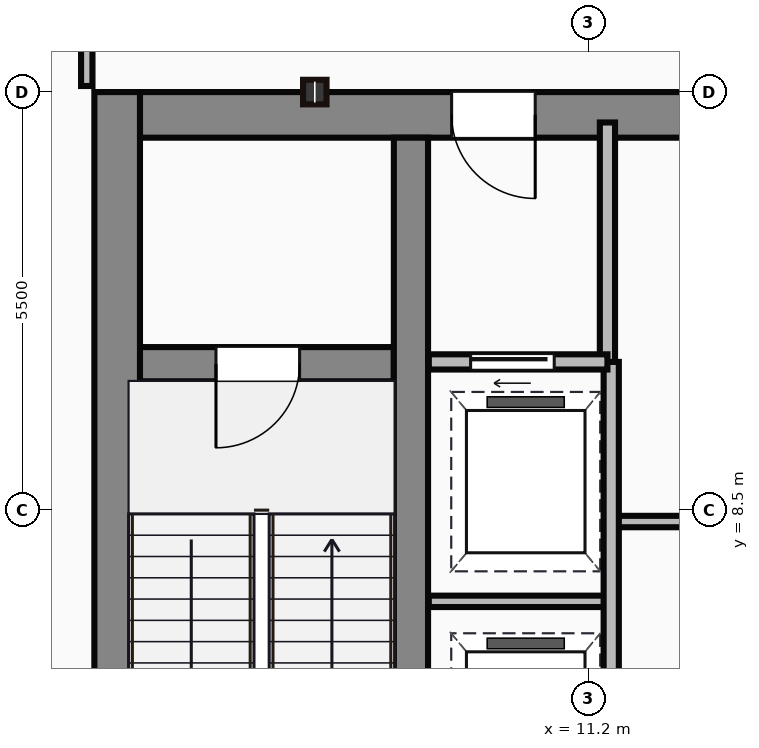
"""IFC4 building model, lengths in metres.
Left out: names, types, materials, properties, quantities, classifications, styles, units other than length and angle.
Written with IfcOpenShell. Run it as: python <this file> out.ifc"""

import sys

from ifc_helpers import new_model, si_unit, direction, frame, frame_2d, origin, origin_2d, place, context, subcontext, project, spatial, rectangle, i_section, extrude, source, transform, mapped, element, fill, save


model = new_model("IFC4")
c1 = context("Model", 3, precision=1e-05, world=origin(), true_north=direction((0.0, 1.0)))
c2 = subcontext(c1, "Body", "Model", "MODEL_VIEW")
j1 = project(units=[si_unit("LENGTHUNIT", "METRE"), si_unit("PLANEANGLEUNIT", "RADIAN")], contexts=[c1])
p1 = place(None, origin())
s1 = spatial("IfcSite", under=j1, at=p1, CompositionType="ELEMENT")
p2 = place(p1, origin())
s2 = spatial("IfcBuilding", under=s1, at=p2, CompositionType="ELEMENT")
p3 = place(p2, frame((0.0, 0.0, 210.5)))
s3 = spatial("IfcBuildingStorey", under=s2, at=p3, CompositionType="ELEMENT", Elevation=210.5)
m1 = source(origin(), c2, "Body", "SweptSolid", [
    extrude(rectangle(XDim=13.1, YDim=0.6, at=frame_2d((6.55, 0.0))), origin(), (0.0, 0.0, 1.0), 3.65),
])
p4 = place(p3, frame((5.0, 0.9, 0.0), z_axis=(0.0, 0.0, 1.0), x_axis=(0.0, 1.0, 0.0)))
e1 = element("IfcWall", 1, at=p4, inside=s3, PredefinedType="SHEAR", context=c2, shape_type="MappedRepresentation", body=[
    mapped(m1, transform((0.0, 0.0, 0.0))),
])
m2 = source(origin(), c2, "Body", "SweptSolid", [
    extrude(rectangle(XDim=9.1, YDim=0.6, at=frame_2d((4.55, 0.0))), origin(), (0.0, 0.0, 1.0), 3.65),
])
p5 = place(p3, frame((5.3, 13.7, 0.0), z_axis=(0.0, 0.0, 1.0), x_axis=(1.0, 0.0, 0.0)))
e2 = element("IfcWall", 2, at=p5, inside=s3, PredefinedType="SHEAR", context=c2, shape_type="MappedRepresentation", body=[
    mapped(m2, transform((0.0, 0.0, 0.0))),
])
p6 = place(p5, frame((4.1, 0.0, 0.0)))
e3 = element("IfcOpeningElement", 3, at=p6, cuts=e2, PredefinedType="OPENING", context=c2, shape_type="SweptSolid", body=[
    extrude(rectangle(XDim=1.1, YDim=2.15, at=frame_2d((0.55, 1.075))), frame((0.0, 0.31, 0.0), z_axis=(0.0, -1.0, 0.0), x_axis=(1.0, 0.0, 0.0)), (0.0, 0.0, 1.0), 0.62),
])
m3 = source(origin(), c2, "Body", "SweptSolid", [
    extrude(rectangle(XDim=12.5, YDim=0.45, at=frame_2d((6.25, 0.0))), origin(), (0.0, 0.0, 1.0), 3.65),
])
p7 = place(p3, frame((8.865, 0.9, 0.0), z_axis=(0.0, 0.0, 1.0), x_axis=(0.0, 1.0, 0.0)))
e4 = element("IfcWall", 4, at=p7, inside=s3, PredefinedType="SHEAR", context=c2, shape_type="MappedRepresentation", body=[
    mapped(m3, transform((0.0, 0.0, 0.0))),
])
m4 = source(origin(), c2, "Body", "SweptSolid", [
    extrude(rectangle(XDim=3.39, YDim=0.45, at=frame_2d((1.695, 0.0))), origin(), (0.0, 0.0, 1.0), 3.65),
])
p8 = place(p3, frame((5.25, 10.42, 0.0), z_axis=(0.0, 0.0, 1.0), x_axis=(1.0, 0.0, 0.0)))
e5 = element("IfcWall", 5, at=p8, inside=s3, PredefinedType="SHEAR", context=c2, shape_type="MappedRepresentation", body=[
    mapped(m4, transform((0.0, 0.0, 0.0))),
])
p9 = place(p8, frame((1.05, 0.0, 0.0)))
e6 = element("IfcOpeningElement", 6, at=p9, cuts=e5, PredefinedType="OPENING", context=c2, shape_type="SweptSolid", body=[
    extrude(rectangle(XDim=1.1, YDim=2.15, at=frame_2d((0.55, 1.075))), frame((0.0, 0.235, 0.0), z_axis=(0.0, -1.0, 0.0), x_axis=(1.0, 0.0, 0.0)), (0.0, 0.0, 1.0), 0.47),
])
m5 = source(origin(), c2, "Body", "SweptSolid", [
    extrude(i_section(OverallWidth=0.309, OverallDepth=0.323, WebThickness=0.014, FlangeThickness=0.023, at=origin_2d()), origin(), (0.0, 0.0, 1.0), 3.65),
])
p10 = place(p3, frame((7.6, 14.0, 0.0), z_axis=(0.0, 0.0, 1.0), x_axis=(1.0, 0.0, 0.0)))
e7 = element("IfcColumn", 7, at=p10, inside=s3, PredefinedType="COLUMN", context=c2, shape_type="MappedRepresentation", body=[
    mapped(m5, transform((0.0, 0.0, 0.0))),
])
m6 = source(origin(), c2, "Body", "SweptSolid", [
    extrude(rectangle(XDim=3.18, YDim=0.2, at=frame_2d((1.59, 0.0))), origin(), (0.0, 0.0, 1.0), 3.4),
])
p11 = place(p3, frame((11.45, 10.42, 0.0), z_axis=(0.0, 0.0, 1.0), x_axis=(0.0, 1.0, 0.0)))
e8 = element("IfcWall", 8, at=p11, inside=s3, PredefinedType="PARTITIONING", context=c2, shape_type="MappedRepresentation", body=[
    mapped(m6, transform((0.0, 0.0, 0.0))),
])
m7 = source(origin(), c2, "Body", "SweptSolid", [
    extrude(rectangle(XDim=2.35, YDim=0.2, at=frame_2d((1.175, 0.0))), origin(), (0.0, 0.0, 1.0), 3.4),
])
p12 = place(p3, frame((9.1, 10.45, 0.0), z_axis=(0.0, 0.0, 1.0), x_axis=(1.0, 0.0, 0.0)))
e9 = element("IfcWall", 9, at=p12, inside=s3, PredefinedType="PARTITIONING", context=c2, shape_type="MappedRepresentation", body=[
    mapped(m7, transform((0.0, 0.0, 0.0))),
])
p13 = place(p12, frame((0.55, 0.0, 0.0)))
e10 = element("IfcOpeningElement", 10, at=p13, cuts=e9, PredefinedType="OPENING", context=c2, shape_type="SweptSolid", body=[
    extrude(rectangle(XDim=1.1, YDim=2.15, at=frame_2d((0.55, 1.075))), frame((0.0, 0.11, 0.0), z_axis=(0.0, -1.0, 0.0), x_axis=(1.0, 0.0, 0.0)), (0.0, 0.0, 1.0), 0.22),
])
m8 = source(origin(), c2, "Body", "SweptSolid", [
    extrude(rectangle(XDim=9.6, YDim=0.2, at=frame_2d((4.8, 0.0))), origin(), (0.0, 0.0, 1.0), 3.4),
])
p14 = place(p3, frame((11.5, 0.85, 0.0), z_axis=(0.0, 0.0, 1.0), x_axis=(0.0, 1.0, 0.0)))
e11 = element("IfcWall", 11, at=p14, inside=s3, PredefinedType="PARTITIONING", context=c2, shape_type="MappedRepresentation", body=[
    mapped(m8, transform((0.0, 0.0, 0.0))),
])
p15 = place(p14, frame((4.2, 0.0, 0.0)))
e12 = element("IfcOpeningElement", 12, at=p15, cuts=e11, PredefinedType="OPENING", context=c2, shape_type="SweptSolid", body=[
    extrude(rectangle(XDim=1.1, YDim=2.15, at=frame_2d((0.55, 1.075))), frame((0.0, 0.11, 0.0), z_axis=(0.0, -1.0, 0.0), x_axis=(1.0, 0.0, 0.0)), (0.0, 0.0, 1.0), 0.22),
])
p16 = place(p14, frame((0.9, 0.0, 0.0)))
e13 = element("IfcOpeningElement", 13, at=p16, cuts=e11, PredefinedType="OPENING", context=c2, shape_type="SweptSolid", body=[
    extrude(rectangle(XDim=1.2, YDim=2.15, at=frame_2d((0.6, 1.075))), frame((0.0, 0.11, 0.0), z_axis=(0.0, -1.0, 0.0), x_axis=(1.0, 0.0, 0.0)), (0.0, 0.0, 1.0), 0.22),
])
m9 = source(origin(), c2, "Body", "SweptSolid", [
    extrude(rectangle(XDim=2.4, YDim=0.15, at=frame_2d((1.2, 0.0))), origin(), (0.0, 0.0, 1.0), 3.4),
])
p17 = place(p3, frame((9.1, 7.3, 0.0), z_axis=(0.0, 0.0, 1.0), x_axis=(1.0, 0.0, 0.0)))
e14 = element("IfcWall", 14, at=p17, inside=s3, PredefinedType="PARTITIONING", context=c2, shape_type="MappedRepresentation", body=[
    mapped(m9, transform((0.0, 0.0, 0.0))),
])
m10 = source(origin(), c2, "Body", "SweptSolid", [
    extrude(rectangle(XDim=11.85, YDim=0.15, at=frame_2d((5.925, 0.0))), origin(), (0.0, 0.0, 1.0), 3.4),
])
p18 = place(p3, frame((11.55, 8.35, 0.0), z_axis=(0.0, 0.0, 1.0), x_axis=(1.0, 0.0, 0.0)))
e15 = element("IfcWall", 15, at=p18, inside=s3, PredefinedType="PARTITIONING", context=c2, shape_type="MappedRepresentation", body=[
    mapped(m10, transform((0.0, 0.0, 0.0))),
])
p19 = place(p18, frame((1.1, 0.0, 0.0)))
e16 = element("IfcOpeningElement", 16, at=p19, cuts=e15, PredefinedType="OPENING", context=c2, shape_type="SweptSolid", body=[
    extrude(rectangle(XDim=0.95, YDim=2.15, at=frame_2d((0.475, 1.075))), frame((0.0, 0.085, 0.0), z_axis=(0.0, -1.0, 0.0), x_axis=(1.0, 0.0, 0.0)), (0.0, 0.0, 1.0), 0.17),
])
p20 = place(p18, frame((9.4, 0.0, 0.0)))
e17 = element("IfcOpeningElement", 17, at=p20, cuts=e15, PredefinedType="OPENING", context=c2, shape_type="SweptSolid", body=[
    extrude(rectangle(XDim=0.95, YDim=2.15, at=frame_2d((0.475, 1.075))), frame((0.0, 0.085, 0.0), z_axis=(0.0, -1.0, 0.0), x_axis=(1.0, 0.0, 0.0)), (0.0, 0.0, 1.0), 0.17),
])
m11 = source(origin(), c2, "Body", "SweptSolid", [
    extrude(rectangle(XDim=2.12, YDim=0.15, at=frame_2d((1.06, 0.0))), origin(), (0.0, 0.0, 1.0), 3.4),
])
p21 = place(p3, frame((4.6, 14.08, 0.0), z_axis=(0.0, 0.0, 1.0), x_axis=(0.0, 1.0, 0.0)))
e18 = element("IfcWall", 18, at=p21, inside=s3, PredefinedType="PARTITIONING", context=c2, shape_type="MappedRepresentation", body=[
    mapped(m11, transform((0.0, 0.0, 0.0))),
])
m12 = source(origin(), c2, "Body", "SweptSolid", [
    extrude(rectangle(XDim=1.1, YDim=2.15, at=frame_2d((0.55, 1.075))), frame((0.0, 0.025, 0.0), z_axis=(0.0, -1.0, 0.0), x_axis=(1.0, 0.0, 0.0)), (0.0, 0.0, 1.0), 0.05),
])
p22 = place(p9, frame((1.1, 0.0, 0.0), z_axis=(0.0, 0.0, 1.0), x_axis=(-1.0, 0.0, 0.0)))
e19 = element("IfcDoor", 19, at=p22, inside=s3, OperationType="SINGLE_SWING_LEFT", PredefinedType="DOOR", context=c2, shape_type="MappedRepresentation", body=[
    mapped(m12, transform((0.0, 0.0, 0.0))),
])
fill(e6, e19)
p23 = place(p6, origin())
e20 = element("IfcDoor", 20, at=p23, inside=s3, OperationType="SINGLE_SWING_RIGHT", PredefinedType="DOOR", context=c2, shape_type="MappedRepresentation", body=[
    mapped(m12, transform((0.0, 0.0, 0.0))),
])
fill(e3, e20)
p24 = place(p13, origin())
e21 = element("IfcDoor", 21, at=p24, inside=s3, OperationType="SLIDING_TO_LEFT", PredefinedType="DOOR", context=c2, shape_type="MappedRepresentation", body=[
    mapped(m12, transform((0.0, 0.0, 0.0))),
])
fill(e10, e21)
save(model, sys.argv[1])
